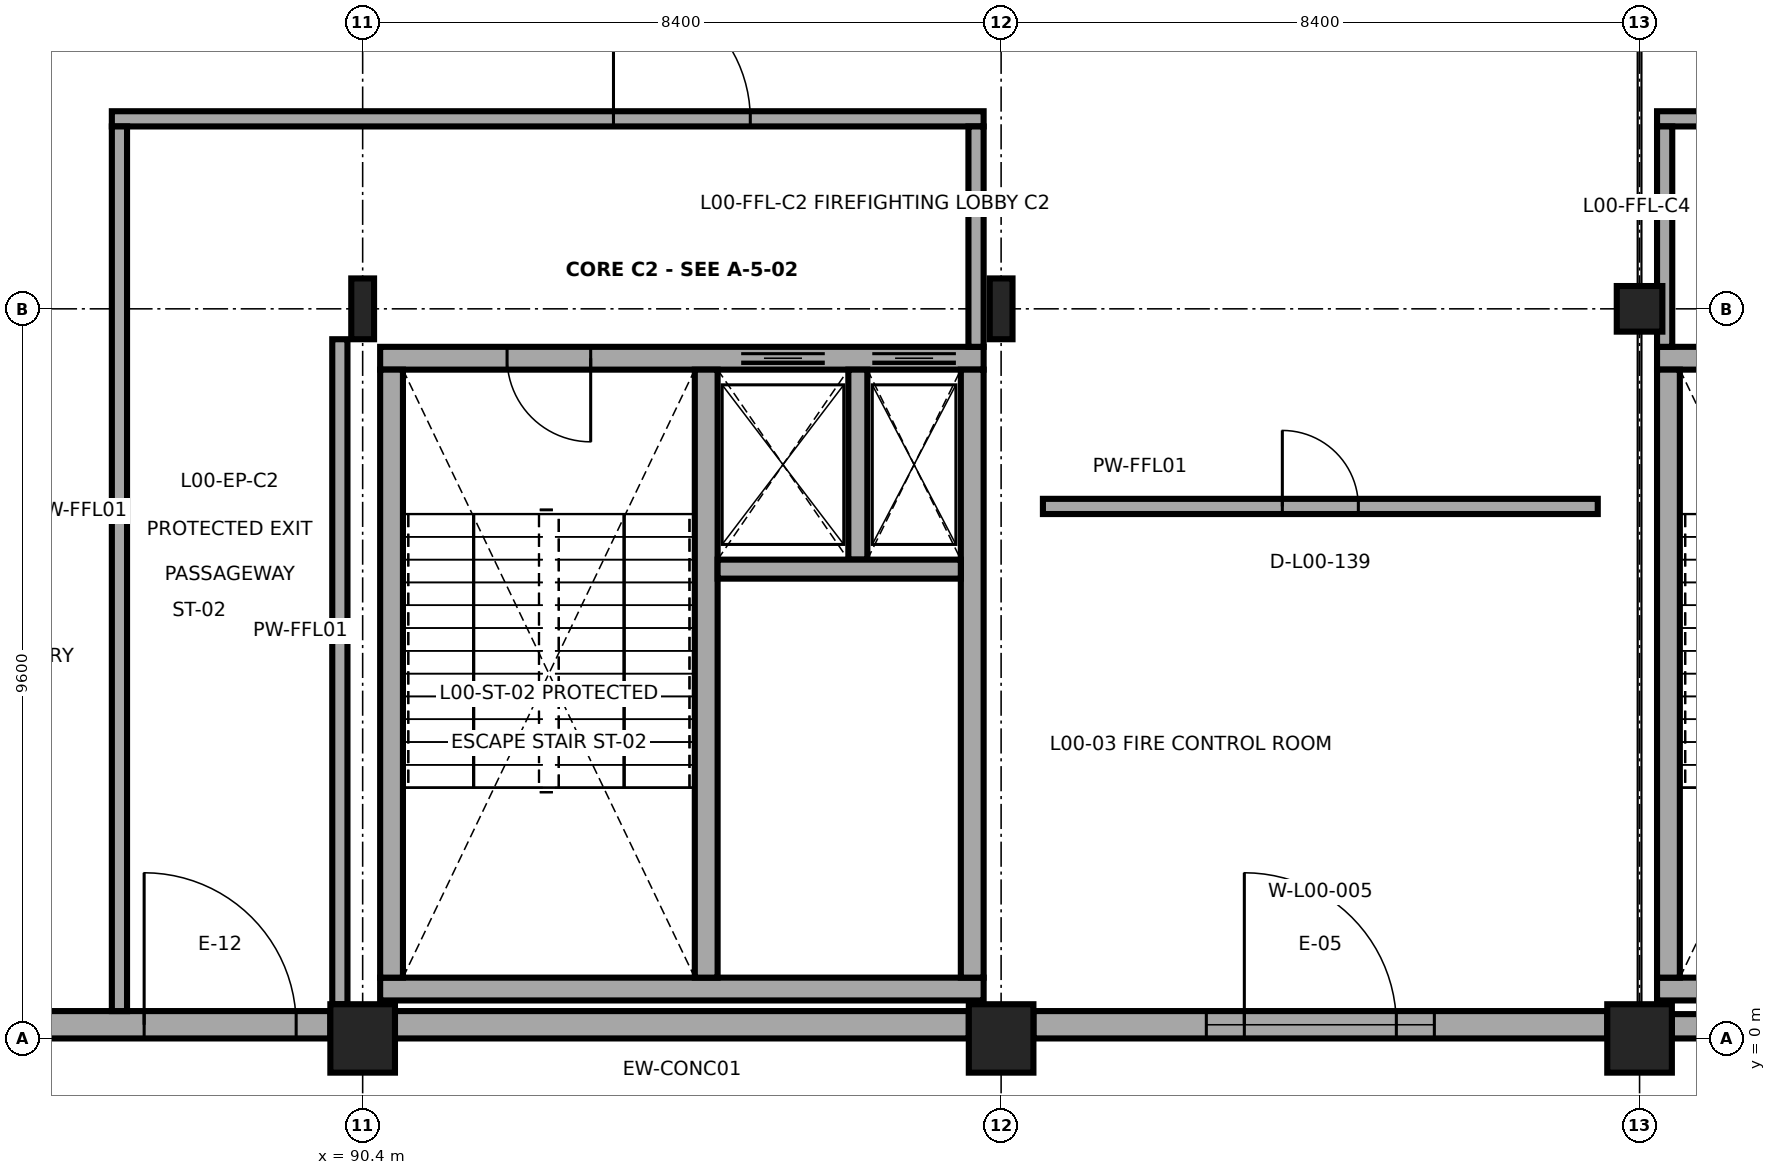
"""IFC4 building model, lengths in metres.
Left out: names, types, materials, properties, quantities, classifications, styles, units other than length and angle.
Written with IfcOpenShell. Run it as: python <this file> out.ifc"""

import sys

from ifc_helpers import new_model, si_unit, direction, frame, frame_2d, origin, origin_2d, place, context, subcontext, project, spatial, rectangle, i_section, extrude, element, fill, save


model = new_model("IFC4")
c1 = context("Model", 3, precision=1e-05, world=origin(), true_north=direction((0.0, 1.0)))
c2 = subcontext(c1, "Body", "Model", "MODEL_VIEW")
j1 = project(units=[si_unit("LENGTHUNIT", "METRE"), si_unit("PLANEANGLEUNIT", "RADIAN")], contexts=[c1])
p1 = place(None, origin())
s1 = spatial("IfcSite", under=j1, at=p1, CompositionType="ELEMENT")
p2 = place(p1, origin())
s2 = spatial("IfcBuilding", under=s1, at=p2, CompositionType="ELEMENT")
p3 = place(p2, origin())
s3 = spatial("IfcBuildingStorey", under=s2, at=p3, CompositionType="ELEMENT", Elevation=0.0)
p4 = place(p3, frame((90.4, 0.0, 0.0), z_axis=(0.0, 0.0, 1.0), x_axis=(1.0, 0.0, 0.0)))
e1 = element("IfcColumn", 1, at=p4, inside=s3, PredefinedType="COLUMN", context=c2, shape_type="SweptSolid", body=[
    extrude(rectangle(XDim=0.85, YDim=0.9, at=origin_2d()), origin(), (0.0, 0.0, 1.0), 8.4),
])
p5 = place(p3, frame((90.4, 9.6, 0.0), z_axis=(0.0, 0.0, 1.0), x_axis=(1.0, 0.0, 0.0)))
e2 = element("IfcColumn", 2, at=p5, inside=s3, PredefinedType="COLUMN", context=c2, shape_type="SweptSolid", body=[
    extrude(i_section(OverallWidth=0.3, OverallDepth=0.8, WebThickness=0.018, FlangeThickness=0.033, FilletRadius=0.03, at=origin_2d()), origin(), (0.0, 0.0, 1.0), 8.4),
])
p6 = place(p3, frame((98.8, 0.0, 0.0), z_axis=(0.0, 0.0, 1.0), x_axis=(1.0, 0.0, 0.0)))
e3 = element("IfcColumn", 3, at=p6, inside=s3, PredefinedType="COLUMN", context=c2, shape_type="SweptSolid", body=[
    extrude(rectangle(XDim=0.85, YDim=0.9, at=origin_2d()), origin(), (0.0, 0.0, 1.0), 8.4),
])
p7 = place(p3, frame((98.8, 9.6, 0.0), z_axis=(0.0, 0.0, 1.0), x_axis=(1.0, 0.0, 0.0)))
e4 = element("IfcColumn", 4, at=p7, inside=s3, PredefinedType="COLUMN", context=c2, shape_type="SweptSolid", body=[
    extrude(i_section(OverallWidth=0.3, OverallDepth=0.8, WebThickness=0.018, FlangeThickness=0.033, FilletRadius=0.03, at=origin_2d()), origin(), (0.0, 0.0, 1.0), 8.4),
])
p8 = place(p3, frame((107.2, 0.0, 0.0), z_axis=(0.0, 0.0, 1.0), x_axis=(1.0, 0.0, 0.0)))
e5 = element("IfcColumn", 5, at=p8, inside=s3, PredefinedType="COLUMN", context=c2, shape_type="SweptSolid", body=[
    extrude(rectangle(XDim=0.85, YDim=0.9, at=origin_2d()), origin(), (0.0, 0.0, 1.0), 8.4),
])
p9 = place(p3, frame((107.2, 9.6, 0.0), z_axis=(0.0, 0.0, 1.0), x_axis=(0.0, 1.0, 0.0)))
e6 = element("IfcColumn", 6, at=p9, inside=s3, PredefinedType="COLUMN", context=c2, shape_type="SweptSolid", body=[
    extrude(rectangle(XDim=0.6, YDim=0.6, at=origin_2d()), origin(), (0.0, 0.0, 1.0), 8.4),
])
p10 = place(p3, frame((82.425, 0.18, 0.0), z_axis=(0.0, 0.0, 1.0), x_axis=(1.0, 0.0, 0.0)))
e7 = element("IfcWall", 7, at=p10, inside=s3, PredefinedType="SOLIDWALL", context=c2, shape_type="SweptSolid", body=[
    extrude(rectangle(XDim=7.55, YDim=0.36, at=frame_2d((3.775, 0.0))), origin(), (0.0, 0.0, 1.0), 7.235),
])
p11 = place(p10, frame((5.1, 0.0, 0.0)))
e8 = element("IfcOpeningElement", 8, at=p11, cuts=e7, PredefinedType="OPENING", context=c2, shape_type="SweptSolid", body=[
    extrude(rectangle(XDim=2.0, YDim=2.4, at=frame_2d((1.0, 1.2))), frame((0.0, 0.19, 0.0), z_axis=(0.0, -1.0, 0.0), x_axis=(1.0, 0.0, 0.0)), (0.0, 0.0, 1.0), 0.38),
])
p12 = place(p3, frame((90.825, 0.18, 0.0), z_axis=(0.0, 0.0, 1.0), x_axis=(1.0, 0.0, 0.0)))
e9 = element("IfcWall", 9, at=p12, inside=s3, PredefinedType="SOLIDWALL", context=c2, shape_type="SweptSolid", body=[
    extrude(rectangle(XDim=7.55, YDim=0.36, at=frame_2d((3.775, 0.0))), origin(), (0.0, 0.0, 1.0), 7.235),
])
p13 = place(p3, frame((99.225, 0.18, 0.0), z_axis=(0.0, 0.0, 1.0), x_axis=(1.0, 0.0, 0.0)))
e10 = element("IfcWall", 10, at=p13, inside=s3, PredefinedType="SOLIDWALL", context=c2, shape_type="SweptSolid", body=[
    extrude(rectangle(XDim=7.55, YDim=0.36, at=frame_2d((3.775, 0.0))), origin(), (0.0, 0.0, 1.0), 7.235),
])
p14 = place(p13, frame((2.775, 0.0, 0.0)))
e11 = element("IfcOpeningElement", 11, at=p14, cuts=e10, PredefinedType="OPENING", context=c2, shape_type="SweptSolid", body=[
    extrude(rectangle(XDim=2.0, YDim=2.4, at=frame_2d((1.0, 1.2))), frame((0.0, 0.19, 0.0), z_axis=(0.0, -1.0, 0.0), x_axis=(1.0, 0.0, 0.0)), (0.0, 0.0, 1.0), 0.38),
])
p15 = place(p13, frame((2.275, 0.0, 3.2)))
e12 = element("IfcOpeningElement", 12, at=p15, cuts=e10, PredefinedType="OPENING", context=c2, shape_type="SweptSolid", body=[
    extrude(rectangle(XDim=3.0, YDim=2.2, at=frame_2d((1.5, 1.1))), frame((0.0, 0.19, 0.0), z_axis=(0.0, -1.0, 0.0), x_axis=(1.0, 0.0, 0.0)), (0.0, 0.0, 1.0), 0.38),
])
p16 = place(p3, frame((107.625, 0.16, 0.0), z_axis=(0.0, 0.0, 1.0), x_axis=(1.0, 0.0, 0.0)))
e13 = element("IfcWall", 13, at=p16, inside=s3, PredefinedType="SOLIDWALL", context=c2, shape_type="SweptSolid", body=[
    extrude(rectangle(XDim=7.825, YDim=0.32, at=frame_2d((3.913, 0.0))), origin(), (0.0, 0.0, 1.0), 6.92),
])
p17 = place(p3, frame((90.63, 0.65, 0.0), z_axis=(0.0, 0.0, 1.0), x_axis=(1.0, 0.0, 0.0)))
e14 = element("IfcWall", 14, at=p17, inside=s3, PredefinedType="SHEAR", context=c2, shape_type="SweptSolid", body=[
    extrude(rectangle(XDim=7.94, YDim=0.3, at=frame_2d((3.97, 0.0))), origin(), (0.0, 0.0, 1.0), 8.15),
])
p18 = place(p3, frame((98.57, 8.95, 0.0), z_axis=(0.0, 0.0, 1.0), x_axis=(-1.0, 0.0, 0.0)))
e15 = element("IfcWall", 15, at=p18, inside=s3, PredefinedType="SHEAR", context=c2, shape_type="SweptSolid", body=[
    extrude(rectangle(XDim=7.94, YDim=0.3, at=frame_2d((3.97, 0.0))), origin(), (0.0, 0.0, 1.0), 8.15),
])
p19 = place(p18, frame((5.17, 0.0, 0.0)))
e16 = element("IfcOpeningElement", 16, at=p19, cuts=e15, PredefinedType="OPENING", context=c2, shape_type="SweptSolid", body=[
    extrude(rectangle(XDim=1.1, YDim=2.2, at=frame_2d((0.55, 1.1))), frame((0.0, 0.16, 0.0), z_axis=(0.0, -1.0, 0.0), x_axis=(1.0, 0.0, 0.0)), (0.0, 0.0, 1.0), 0.32),
])
p20 = place(p18, frame((2.09, 0.0, 0.0)))
e17 = element("IfcOpeningElement", 17, at=p20, cuts=e15, PredefinedType="OPENING", context=c2, shape_type="SweptSolid", body=[
    extrude(rectangle(XDim=1.1, YDim=2.1, at=frame_2d((0.55, 1.05))), frame((0.0, 0.16, 0.0), z_axis=(0.0, -1.0, 0.0), x_axis=(1.0, 0.0, 0.0)), (0.0, 0.0, 1.0), 0.32),
])
p21 = place(p18, frame((0.365, 0.0, 0.0)))
e18 = element("IfcOpeningElement", 18, at=p21, cuts=e15, PredefinedType="OPENING", context=c2, shape_type="SweptSolid", body=[
    extrude(rectangle(XDim=1.1, YDim=2.1, at=frame_2d((0.55, 1.05))), frame((0.0, 0.16, 0.0), z_axis=(0.0, -1.0, 0.0), x_axis=(1.0, 0.0, 0.0)), (0.0, 0.0, 1.0), 0.32),
])
for number, where, z_axis, x_axis in (
    (19, (90.78, 8.8, 0.0), (0.0, 0.0, 1.0), (0.0, -1.0, 0.0)),
    (20, (98.42, 0.8, 0.0), (0.0, 0.0, 1.0), (0.0, 1.0, 0.0)),
    (21, (94.92, 0.8, 0.0), (0.0, 0.0, 1.0), (0.0, 1.0, 0.0)),
):
    element("IfcWall", number, at=place(p3, frame(where, z_axis=z_axis, x_axis=x_axis)), inside=s3, PredefinedType="SHEAR", context=c2, shape_type="SweptSolid", body=[
        extrude(rectangle(XDim=8.0, YDim=0.3, at=frame_2d((4.0, 0.0))), origin(), (0.0, 0.0, 1.0), 8.15),
    ])
p22 = place(p3, frame((96.915, 6.3, 0.0), z_axis=(0.0, 0.0, 1.0), x_axis=(0.0, 1.0, 0.0)))
e22 = element("IfcWall", 22, at=p22, inside=s3, PredefinedType="SHEAR", context=c2, shape_type="SweptSolid", body=[
    extrude(rectangle(XDim=2.5, YDim=0.25, at=frame_2d((1.25, 0.0))), origin(), (0.0, 0.0, 1.0), 8.15),
])
p23 = place(p3, frame((95.07, 6.175, 0.0), z_axis=(0.0, 0.0, 1.0), x_axis=(1.0, 0.0, 0.0)))
e23 = element("IfcWall", 23, at=p23, inside=s3, PredefinedType="SHEAR", context=c2, shape_type="SweptSolid", body=[
    extrude(rectangle(XDim=3.2, YDim=0.25, at=frame_2d((1.6, 0.0))), origin(), (0.0, 0.0, 1.0), 8.15),
])
p24 = place(p3, frame((87.1, 12.1, 0.0), z_axis=(0.0, 0.0, 1.0), x_axis=(1.0, 0.0, 0.0)))
e24 = element("IfcWall", 24, at=p24, inside=s3, PredefinedType="SOLIDWALL", context=c2, shape_type="SweptSolid", body=[
    extrude(rectangle(XDim=11.47, YDim=0.2, at=frame_2d((5.735, 0.0))), origin(), (0.0, 0.0, 1.0), 7.532),
])
p25 = place(p24, frame((6.6, 0.0, 0.0)))
e25 = element("IfcOpeningElement", 25, at=p25, cuts=e24, PredefinedType="OPENING", context=c2, shape_type="SweptSolid", body=[
    extrude(rectangle(XDim=1.8, YDim=2.2, at=frame_2d((0.9, 1.1))), frame((0.0, 0.11, 0.0), z_axis=(0.0, -1.0, 0.0), x_axis=(1.0, 0.0, 0.0)), (0.0, 0.0, 1.0), 0.22),
])
p26 = place(p3, frame((98.47, 12.0, 0.0), z_axis=(0.0, 0.0, 1.0), x_axis=(0.0, -1.0, 0.0)))
e26 = element("IfcWall", 26, at=p26, inside=s3, PredefinedType="SOLIDWALL", context=c2, shape_type="SweptSolid", body=[
    extrude(rectangle(XDim=2.9, YDim=0.2, at=frame_2d((1.45, 0.0))), origin(), (0.0, 0.0, 1.0), 7.582),
])
p27 = place(p3, frame((87.2, 0.36, 0.0), z_axis=(0.0, 0.0, 1.0), x_axis=(0.0, 1.0, 0.0)))
e27 = element("IfcWall", 27, at=p27, inside=s3, PredefinedType="SOLIDWALL", context=c2, shape_type="SweptSolid", body=[
    extrude(rectangle(XDim=11.64, YDim=0.2, at=frame_2d((5.82, 0.0))), origin(), (0.0, 0.0, 1.0), 7.232),
])
p28 = place(p3, frame((90.1, 9.2, 0.0), z_axis=(0.0, 0.0, 1.0), x_axis=(0.0, -1.0, 0.0)))
e28 = element("IfcWall", 28, at=p28, inside=s3, PredefinedType="SOLIDWALL", context=c2, shape_type="SweptSolid", body=[
    extrude(rectangle(XDim=8.75, YDim=0.2, at=frame_2d((4.375, 0.0))), origin(), (0.0, 0.0, 1.0), 8.135),
])
p29 = place(p3, frame((107.43, 0.65, 0.0), z_axis=(0.0, 0.0, 1.0), x_axis=(1.0, 0.0, 0.0)))
e29 = element("IfcWall", 29, at=p29, inside=s3, PredefinedType="SHEAR", context=c2, shape_type="SweptSolid", body=[
    extrude(rectangle(XDim=7.94, YDim=0.3, at=frame_2d((3.97, 0.0))), origin(), (0.0, 0.0, 1.0), 8.15),
])
p30 = place(p3, frame((115.37, 8.95, 0.0), z_axis=(0.0, 0.0, 1.0), x_axis=(-1.0, 0.0, 0.0)))
e30 = element("IfcWall", 30, at=p30, inside=s3, PredefinedType="SHEAR", context=c2, shape_type="SweptSolid", body=[
    extrude(rectangle(XDim=7.94, YDim=0.3, at=frame_2d((3.97, 0.0))), origin(), (0.0, 0.0, 1.0), 8.15),
])
p31 = place(p30, frame((5.17, 0.0, 0.0)))
e31 = element("IfcOpeningElement", 31, at=p31, cuts=e30, PredefinedType="OPENING", context=c2, shape_type="SweptSolid", body=[
    extrude(rectangle(XDim=1.1, YDim=2.2, at=frame_2d((0.55, 1.1))), frame((0.0, 0.16, 0.0), z_axis=(0.0, -1.0, 0.0), x_axis=(1.0, 0.0, 0.0)), (0.0, 0.0, 1.0), 0.32),
])
p32 = place(p30, frame((1.35, 0.0, 0.0)))
e32 = element("IfcOpeningElement", 32, at=p32, cuts=e30, PredefinedType="OPENING", context=c2, shape_type="SweptSolid", body=[
    extrude(rectangle(XDim=1.1, YDim=2.1, at=frame_2d((0.55, 1.05))), frame((0.0, 0.16, 0.0), z_axis=(0.0, -1.0, 0.0), x_axis=(1.0, 0.0, 0.0)), (0.0, 0.0, 1.0), 0.32),
])
p33 = place(p3, frame((107.58, 8.8, 0.0), z_axis=(0.0, 0.0, 1.0), x_axis=(0.0, -1.0, 0.0)))
e33 = element("IfcWall", 33, at=p33, inside=s3, PredefinedType="SHEAR", context=c2, shape_type="SweptSolid", body=[
    extrude(rectangle(XDim=8.0, YDim=0.3, at=frame_2d((4.0, 0.0))), origin(), (0.0, 0.0, 1.0), 8.15),
])
p34 = place(p3, frame((107.43, 12.1, 0.0), z_axis=(0.0, 0.0, 1.0), x_axis=(1.0, 0.0, 0.0)))
e34 = element("IfcWall", 34, at=p34, inside=s3, PredefinedType="SOLIDWALL", context=c2, shape_type="SweptSolid", body=[
    extrude(rectangle(XDim=11.47, YDim=0.2, at=frame_2d((5.735, 0.0))), origin(), (0.0, 0.0, 1.0), 7.532),
])
p35 = place(p34, frame((3.07, 0.0, 0.0)))
e35 = element("IfcOpeningElement", 35, at=p35, cuts=e34, PredefinedType="OPENING", context=c2, shape_type="SweptSolid", body=[
    extrude(rectangle(XDim=1.8, YDim=2.2, at=frame_2d((0.9, 1.1))), frame((0.0, 0.11, 0.0), z_axis=(0.0, -1.0, 0.0), x_axis=(1.0, 0.0, 0.0)), (0.0, 0.0, 1.0), 0.22),
])
p36 = place(p3, frame((107.53, 9.1, 0.0), z_axis=(0.0, 0.0, 1.0), x_axis=(0.0, 1.0, 0.0)))
e36 = element("IfcWall", 36, at=p36, inside=s3, PredefinedType="SOLIDWALL", context=c2, shape_type="SweptSolid", body=[
    extrude(rectangle(XDim=2.9, YDim=0.2, at=frame_2d((1.45, 0.0))), origin(), (0.0, 0.0, 1.0), 6.932),
])
p37 = place(p3, frame((99.35, 7.0, 0.0), z_axis=(0.0, 0.0, 1.0), x_axis=(1.0, 0.0, 0.0)))
e37 = element("IfcWall", 37, at=p37, inside=s3, PredefinedType="SOLIDWALL", context=c2, shape_type="SweptSolid", body=[
    extrude(rectangle(XDim=7.3, YDim=0.2, at=frame_2d((3.65, 0.0))), origin(), (0.0, 0.0, 1.0), 7.632),
])
p38 = place(p37, frame((3.15, 0.0, 0.0)))
e38 = element("IfcOpeningElement", 38, at=p38, cuts=e37, PredefinedType="OPENING", context=c2, shape_type="SweptSolid", body=[
    extrude(rectangle(XDim=1.0, YDim=2.15, at=frame_2d((0.5, 1.075))), frame((0.0, 0.11, 0.0), z_axis=(0.0, -1.0, 0.0), x_axis=(1.0, 0.0, 0.0)), (0.0, 0.0, 1.0), 0.22),
])
p39 = place(p11, frame((2.0, 0.0, 0.0), z_axis=(0.0, 0.0, 1.0), x_axis=(-1.0, 0.0, 0.0)))
e39 = element("IfcDoor", 39, at=p39, inside=s3, OperationType="DOUBLE_DOOR_SINGLE_SWING", PredefinedType="DOOR", context=c2, shape_type="SweptSolid", body=[
    extrude(rectangle(XDim=2.0, YDim=2.4, at=frame_2d((1.0, 1.2))), frame((0.0, 0.025, 0.0), z_axis=(0.0, -1.0, 0.0), x_axis=(1.0, 0.0, 0.0)), (0.0, 0.0, 1.0), 0.05),
])
fill(e8, e39)
p40 = place(p14, frame((2.0, 0.0, 0.0), z_axis=(0.0, 0.0, 1.0), x_axis=(-1.0, 0.0, 0.0)))
e40 = element("IfcDoor", 40, at=p40, inside=s3, OperationType="DOUBLE_DOOR_SINGLE_SWING", PredefinedType="DOOR", context=c2, shape_type="SweptSolid", body=[
    extrude(rectangle(XDim=2.0, YDim=2.4, at=frame_2d((1.0, 1.2))), frame((0.0, 0.025, 0.0), z_axis=(0.0, -1.0, 0.0), x_axis=(1.0, 0.0, 0.0)), (0.0, 0.0, 1.0), 0.05),
])
fill(e11, e40)
p41 = place(p15, origin())
e41 = element("IfcWindow", 41, at=p41, inside=s3, PartitioningType="SINGLE_PANEL", PredefinedType="WINDOW", context=c2, shape_type="SweptSolid", body=[
    extrude(rectangle(XDim=3.0, YDim=2.2, at=frame_2d((1.5, 1.1))), frame((0.0, 0.03, 0.0), z_axis=(0.0, -1.0, 0.0), x_axis=(1.0, 0.0, 0.0)), (0.0, 0.0, 1.0), 0.06),
])
fill(e12, e41)
p42 = place(p19, origin())
e42 = element("IfcDoor", 42, at=p42, inside=s3, OperationType="SINGLE_SWING_LEFT", PredefinedType="DOOR", context=c2, shape_type="SweptSolid", body=[
    extrude(rectangle(XDim=1.1, YDim=2.2, at=frame_2d((0.55, 1.1))), frame((0.0, 0.025, 0.0), z_axis=(0.0, -1.0, 0.0), x_axis=(1.0, 0.0, 0.0)), (0.0, 0.0, 1.0), 0.05),
])
fill(e16, e42)
p43 = place(p20, origin())
e43 = element("IfcDoor", 43, at=p43, inside=s3, OperationType="SLIDING_TO_LEFT", PredefinedType="DOOR", context=c2, shape_type="SweptSolid", body=[
    extrude(rectangle(XDim=1.1, YDim=2.1, at=frame_2d((0.55, 1.05))), frame((0.0, 0.025, 0.0), z_axis=(0.0, -1.0, 0.0), x_axis=(1.0, 0.0, 0.0)), (0.0, 0.0, 1.0), 0.05),
])
fill(e17, e43)
p44 = place(p21, origin())
e44 = element("IfcDoor", 44, at=p44, inside=s3, OperationType="SLIDING_TO_LEFT", PredefinedType="DOOR", context=c2, shape_type="SweptSolid", body=[
    extrude(rectangle(XDim=1.1, YDim=2.1, at=frame_2d((0.55, 1.05))), frame((0.0, 0.025, 0.0), z_axis=(0.0, -1.0, 0.0), x_axis=(1.0, 0.0, 0.0)), (0.0, 0.0, 1.0), 0.05),
])
fill(e18, e44)
p45 = place(p25, origin())
e45 = element("IfcDoor", 45, at=p45, inside=s3, OperationType="DOUBLE_DOOR_SINGLE_SWING", PredefinedType="DOOR", context=c2, shape_type="SweptSolid", body=[
    extrude(rectangle(XDim=1.8, YDim=2.2, at=frame_2d((0.9, 1.1))), frame((0.0, 0.025, 0.0), z_axis=(0.0, -1.0, 0.0), x_axis=(1.0, 0.0, 0.0)), (0.0, 0.0, 1.0), 0.05),
])
fill(e25, e45)
p46 = place(p38, origin())
e46 = element("IfcDoor", 46, at=p46, inside=s3, OperationType="SINGLE_SWING_LEFT", PredefinedType="DOOR", context=c2, shape_type="SweptSolid", body=[
    extrude(rectangle(XDim=1.0, YDim=2.15, at=frame_2d((0.5, 1.075))), frame((0.0, 0.025, 0.0), z_axis=(0.0, -1.0, 0.0), x_axis=(1.0, 0.0, 0.0)), (0.0, 0.0, 1.0), 0.05),
])
fill(e38, e46)
save(model, sys.argv[1])
